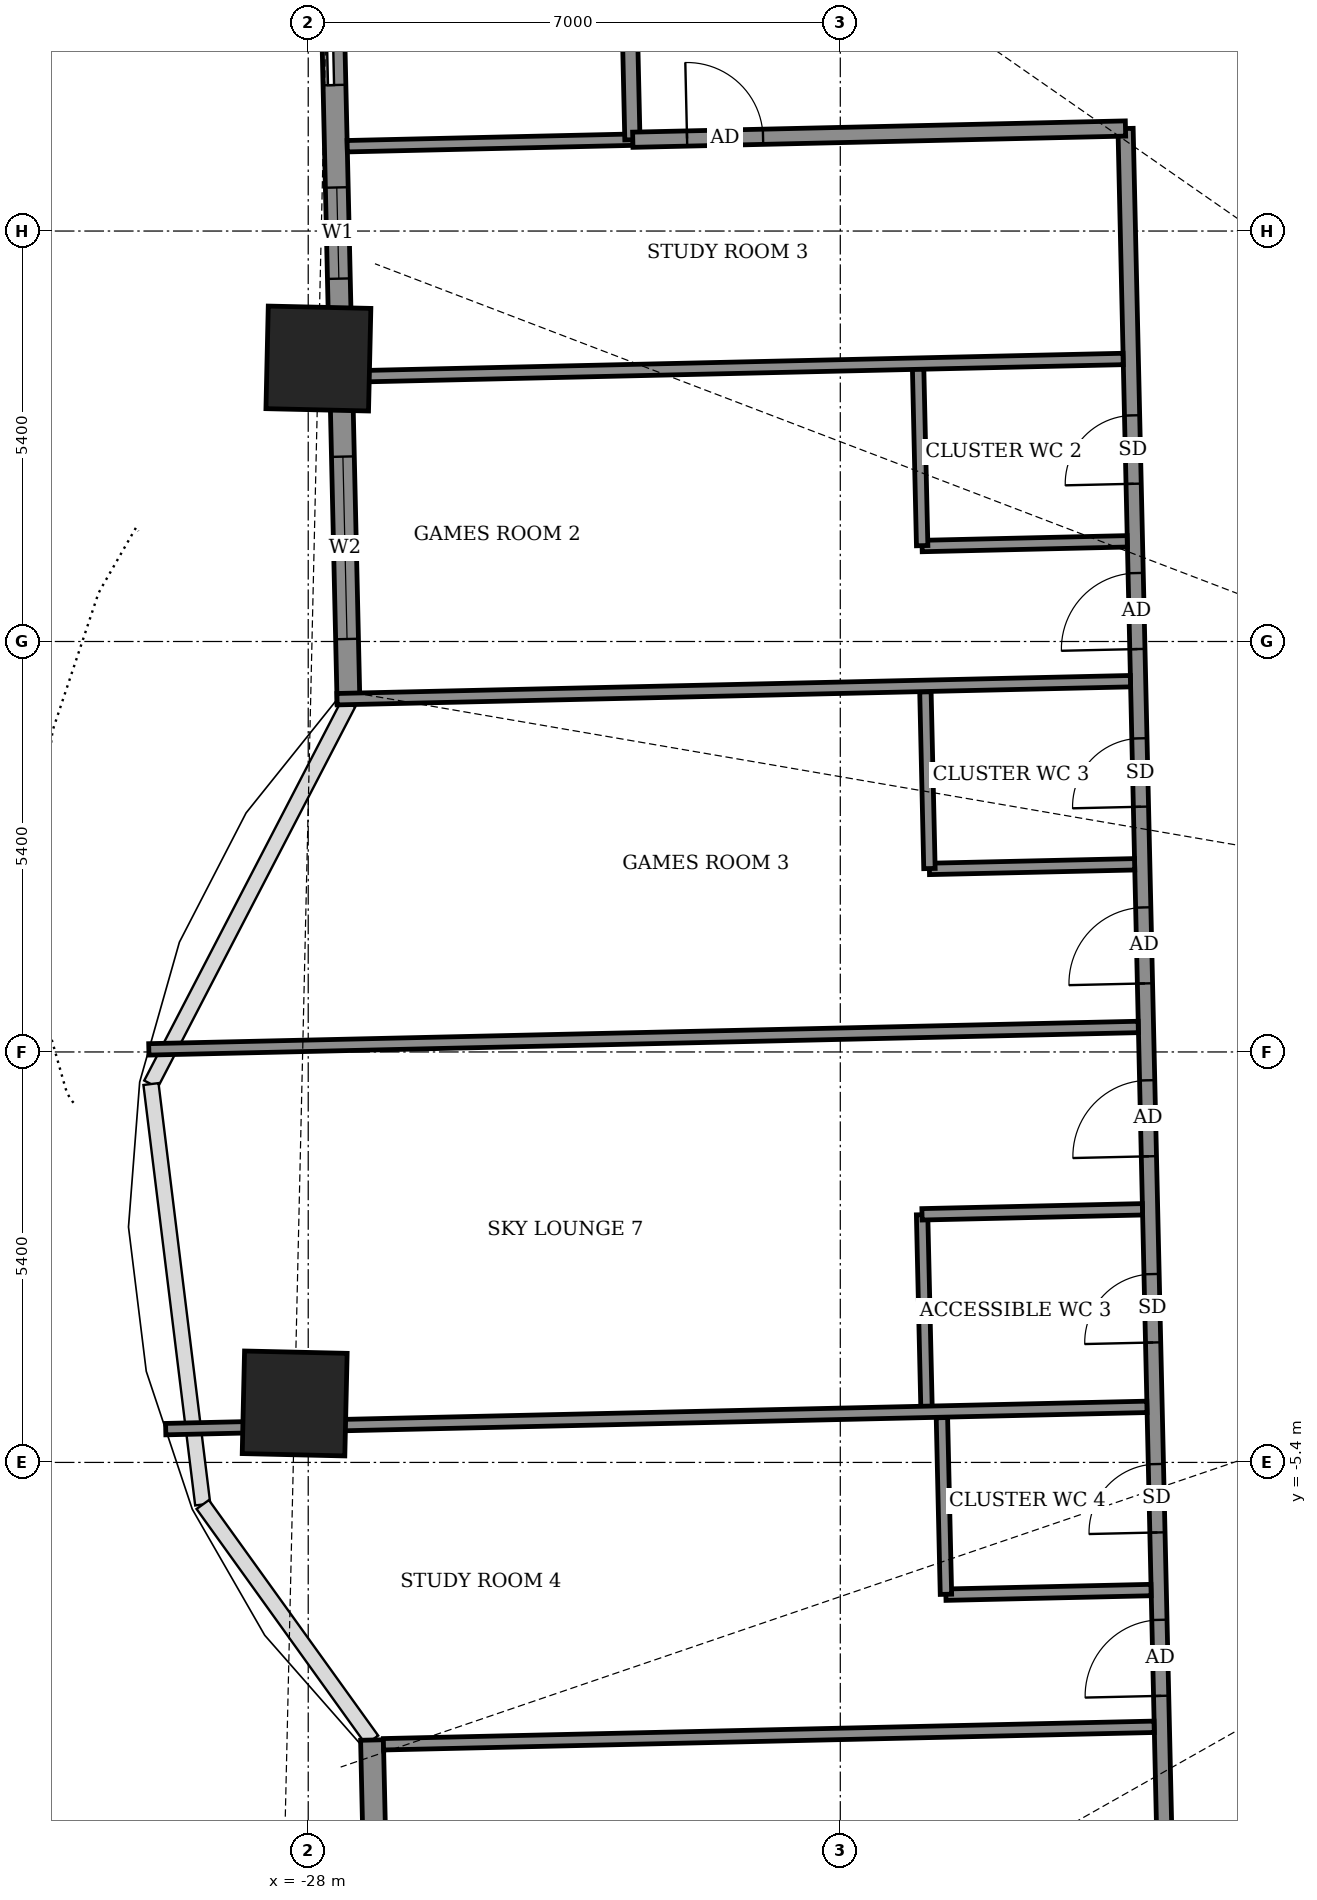
"""IFC4 building model, lengths in metres.
Left out: names, types, materials, properties, quantities, classifications, styles, units other than length and angle.
Written with IfcOpenShell. Run it as: python <this file> out.ifc"""

import sys

from ifc_helpers import new_model, si_unit, direction, frame, frame_2d, origin, origin_2d, place, context, subcontext, project, spatial, rectangle, extrude, element, fill, save


model = new_model("IFC4")
c1 = context("Model", 3, precision=1e-05, world=origin(), true_north=direction((0.0, 1.0)))
c2 = subcontext(c1, "Body", "Model", "MODEL_VIEW")
j1 = project(units=[si_unit("LENGTHUNIT", "METRE"), si_unit("PLANEANGLEUNIT", "RADIAN")], contexts=[c1])
p1 = place(None, origin())
s1 = spatial("IfcSite", under=j1, at=p1, CompositionType="ELEMENT")
p2 = place(p1, origin())
s2 = spatial("IfcBuilding", under=s1, at=p2, CompositionType="ELEMENT")
p3 = place(p2, frame((0.0, 0.0, 125.5)))
s3 = spatial("IfcBuildingStorey", under=s2, at=p3, CompositionType="ELEMENT", Elevation=125.5)
for number, where, z_axis, x_axis in (
    (1, (-28.178, -4.624, -0.55), (0.0, 0.0, 1.0), (-0.023, -1.0, 0.0)),
    (2, (-27.866, 9.123, -0.55), (0.0, 0.0, 1.0), (-0.023, -1.0, 0.0)),
):
    element("IfcColumn", number, at=place(p3, frame(where, z_axis=z_axis, x_axis=x_axis)), inside=s3, PredefinedType="COLUMN", context=c2, shape_type="SweptSolid", body=[
        extrude(rectangle(XDim=1.35, YDim=1.35, at=origin_2d()), origin(), (0.0, 0.0, 1.0), 4.6),
    ])
p4 = place(p3, frame((-27.733, 16.154, 0.0), z_axis=(0.0, 0.0, 1.0), x_axis=(0.022721884592, -0.999741824653, 0.0)))
e3 = element("IfcWall", 3, at=p4, inside=s3, PredefinedType="SOLIDWALL", context=c2, shape_type="SweptSolid", body=[
    extrude(rectangle(XDim=11.572, YDim=0.3, at=frame_2d((5.786, 0.0))), origin(), (0.0, 0.0, 1.0), 2.65),
])
p5 = place(p4, frame((1.934, 0.0, 0.0)))
e4 = element("IfcOpeningElement", 4, at=p5, cuts=e3, PredefinedType="OPENING", context=c2, shape_type="SweptSolid", body=[
    extrude(rectangle(XDim=1.5, YDim=2.4, at=frame_2d((0.75, 1.2))), frame((0.0, 0.16, 0.0), z_axis=(0.0, -1.0, 0.0), x_axis=(1.0, 0.0, 0.0)), (0.0, 0.0, 1.0), 0.32),
])
p6 = place(p4, frame((4.782, 0.0, 0.9)))
e5 = element("IfcOpeningElement", 5, at=p6, cuts=e3, PredefinedType="OPENING", context=c2, shape_type="SweptSolid", body=[
    extrude(rectangle(XDim=1.2, YDim=1.5, at=frame_2d((0.6, 0.75))), frame((0.0, 0.16, 0.0), z_axis=(0.0, -1.0, 0.0), x_axis=(1.0, 0.0, 0.0)), (0.0, 0.0, 1.0), 0.32),
])
p7 = place(p4, frame((8.324, 0.0, 0.9)))
e6 = element("IfcOpeningElement", 6, at=p7, cuts=e3, PredefinedType="OPENING", context=c2, shape_type="SweptSolid", body=[
    extrude(rectangle(XDim=2.4, YDim=1.5, at=frame_2d((1.2, 0.75))), frame((0.0, 0.16, 0.0), z_axis=(0.0, -1.0, 0.0), x_axis=(1.0, 0.0, 0.0)), (0.0, 0.0, 1.0), 0.32),
])
p8 = place(p3, frame((-27.161, -9.052, 0.0), z_axis=(0.0, 0.0, 1.0), x_axis=(0.022665616813, -0.999743101909, 0.0)))
e7 = element("IfcWall", 7, at=p8, inside=s3, PredefinedType="SOLIDWALL", context=c2, shape_type="SweptSolid", body=[
    extrude(rectangle(XDim=11.73, YDim=0.3, at=frame_2d((5.865, 0.0))), origin(), (0.0, 0.0, 1.0), 2.55),
])
p9 = place(p8, frame((4.231, 0.0, 0.0)))
e8 = element("IfcOpeningElement", 8, at=p9, cuts=e7, PredefinedType="OPENING", context=c2, shape_type="SweptSolid", body=[
    extrude(rectangle(XDim=1.5, YDim=2.4, at=frame_2d((0.75, 1.2))), frame((0.0, 0.16, 0.0), z_axis=(0.0, -1.0, 0.0), x_axis=(1.0, 0.0, 0.0)), (0.0, 0.0, 1.0), 0.32),
])
p10 = place(p8, frame((9.847, 0.0, 0.9)))
e9 = element("IfcOpeningElement", 9, at=p10, cuts=e7, PredefinedType="OPENING", context=c2, shape_type="SweptSolid", body=[
    extrude(rectangle(XDim=1.2, YDim=1.5, at=frame_2d((0.6, 0.75))), frame((0.0, 0.16, 0.0), z_axis=(0.0, -1.0, 0.0), x_axis=(1.0, 0.0, 0.0)), (0.0, 0.0, 1.0), 0.32),
])
p11 = place(p3, frame((-30.307, 7.701, 0.0), z_axis=(0.0, 0.0, 1.0), x_axis=(-0.022706615587, 0.999742171567, 0.0)))
e10 = element("IfcWall", 10, at=p11, inside=s3, PredefinedType="USERDEFINED", context=c2, shape_type="SweptSolid", body=[
    extrude(rectangle(XDim=6.0, YDim=0.55, at=frame_2d((3.0, 0.0))), origin(), (0.0, 0.0, 1.0), 0.8),
])
p12 = place(p3, frame((-29.853, -12.294, 0.0), z_axis=(0.0, 0.0, 1.0), x_axis=(-0.022590224177, 0.999744808324, 0.0)))
e11 = element("IfcWall", 11, at=p12, inside=s3, PredefinedType="USERDEFINED", context=c2, shape_type="SweptSolid", body=[
    extrude(rectangle(XDim=2.875, YDim=0.55, at=frame_2d((1.438, 0.0))), origin(), (0.0, 0.0, 1.0), 0.8),
])
p13 = place(p3, frame((-16.603, -16.218, 0.0), z_axis=(0.0, 0.0, 1.0), x_axis=(-0.022698146637, 0.999742363881, 0.0)))
e12 = element("IfcWall", 12, at=p13, inside=s3, PredefinedType="PARTITIONING", context=c2, shape_type="SweptSolid", body=[
    extrude(rectangle(XDim=28.374, YDim=0.2, at=frame_2d((14.187, 0.0))), origin(), (0.0, 0.0, 1.0), 2.55),
])
p14 = place(p13, frame((21.524, 0.0, 0.0)))
e13 = element("IfcOpeningElement", 13, at=p14, cuts=e12, PredefinedType="OPENING", context=c2, shape_type="SweptSolid", body=[
    extrude(rectangle(XDim=1.0, YDim=2.1, at=frame_2d((0.5, 1.05))), frame((0.0, 0.11, 0.0), z_axis=(0.0, -1.0, 0.0), x_axis=(1.0, 0.0, 0.0)), (0.0, 0.0, 1.0), 0.22),
])
p15 = place(p13, frame((23.699, 0.0, 0.0)))
e14 = element("IfcOpeningElement", 14, at=p15, cuts=e12, PredefinedType="OPENING", context=c2, shape_type="SweptSolid", body=[
    extrude(rectangle(XDim=0.9, YDim=2.1, at=frame_2d((0.45, 1.05))), frame((0.0, 0.11, 0.0), z_axis=(0.0, -1.0, 0.0), x_axis=(1.0, 0.0, 0.0)), (0.0, 0.0, 1.0), 0.22),
])
p16 = place(p13, frame((17.124, 0.0, 0.0)))
e15 = element("IfcOpeningElement", 15, at=p16, cuts=e12, PredefinedType="OPENING", context=c2, shape_type="SweptSolid", body=[
    extrude(rectangle(XDim=1.0, YDim=2.1, at=frame_2d((0.5, 1.05))), frame((0.0, 0.11, 0.0), z_axis=(0.0, -1.0, 0.0), x_axis=(1.0, 0.0, 0.0)), (0.0, 0.0, 1.0), 0.22),
])
p17 = place(p13, frame((19.449, 0.0, 0.0)))
e16 = element("IfcOpeningElement", 16, at=p17, cuts=e12, PredefinedType="OPENING", context=c2, shape_type="SweptSolid", body=[
    extrude(rectangle(XDim=0.9, YDim=2.1, at=frame_2d((0.45, 1.05))), frame((0.0, 0.11, 0.0), z_axis=(0.0, -1.0, 0.0), x_axis=(1.0, 0.0, 0.0)), (0.0, 0.0, 1.0), 0.22),
])
p18 = place(p13, frame((14.849, 0.0, 0.0)))
e17 = element("IfcOpeningElement", 17, at=p18, cuts=e12, PredefinedType="OPENING", context=c2, shape_type="SweptSolid", body=[
    extrude(rectangle(XDim=1.0, YDim=2.1, at=frame_2d((0.5, 1.05))), frame((0.0, 0.11, 0.0), z_axis=(0.0, -1.0, 0.0), x_axis=(1.0, 0.0, 0.0)), (0.0, 0.0, 1.0), 0.22),
])
p19 = place(p13, frame((12.399, 0.0, 0.0)))
e18 = element("IfcOpeningElement", 18, at=p19, cuts=e12, PredefinedType="OPENING", context=c2, shape_type="SweptSolid", body=[
    extrude(rectangle(XDim=0.9, YDim=2.1, at=frame_2d((0.45, 1.05))), frame((0.0, 0.11, 0.0), z_axis=(0.0, -1.0, 0.0), x_axis=(1.0, 0.0, 0.0)), (0.0, 0.0, 1.0), 0.22),
])
p20 = place(p13, frame((7.749, 0.0, 0.0)))
e19 = element("IfcOpeningElement", 19, at=p20, cuts=e12, PredefinedType="OPENING", context=c2, shape_type="SweptSolid", body=[
    extrude(rectangle(XDim=1.0, YDim=2.1, at=frame_2d((0.5, 1.05))), frame((0.0, 0.11, 0.0), z_axis=(0.0, -1.0, 0.0), x_axis=(1.0, 0.0, 0.0)), (0.0, 0.0, 1.0), 0.22),
])
p21 = place(p13, frame((9.899, 0.0, 0.0)))
e20 = element("IfcOpeningElement", 20, at=p21, cuts=e12, PredefinedType="OPENING", context=c2, shape_type="SweptSolid", body=[
    extrude(rectangle(XDim=0.9, YDim=2.1, at=frame_2d((0.45, 1.05))), frame((0.0, 0.11, 0.0), z_axis=(0.0, -1.0, 0.0), x_axis=(1.0, 0.0, 0.0)), (0.0, 0.0, 1.0), 0.22),
])
p22 = place(p13, frame((4.374, 0.0, 0.0)))
e21 = element("IfcOpeningElement", 21, at=p22, cuts=e12, PredefinedType="OPENING", context=c2, shape_type="SweptSolid", body=[
    extrude(rectangle(XDim=1.0, YDim=2.1, at=frame_2d((0.5, 1.05))), frame((0.0, 0.11, 0.0), z_axis=(0.0, -1.0, 0.0), x_axis=(1.0, 0.0, 0.0)), (0.0, 0.0, 1.0), 0.22),
])
p23 = place(p13, frame((0.75, 0.0, 0.0)))
e22 = element("IfcOpeningElement", 22, at=p23, cuts=e12, PredefinedType="OPENING", context=c2, shape_type="SweptSolid", body=[
    extrude(rectangle(XDim=0.9, YDim=2.1, at=frame_2d((0.45, 1.05))), frame((0.0, 0.11, 0.0), z_axis=(0.0, -1.0, 0.0), x_axis=(1.0, 0.0, 0.0)), (0.0, 0.0, 1.0), 0.22),
])
p24 = place(p3, frame((-27.01, -9.108, 0.0), z_axis=(0.0, 0.0, 1.0), x_axis=(0.999742841246, 0.022677111331, 0.0)))
e23 = element("IfcWall", 23, at=p24, inside=s3, PredefinedType="PARTITIONING", context=c2, shape_type="SweptSolid", body=[
    extrude(rectangle(XDim=10.142, YDim=0.15, at=frame_2d((5.071, 0.0))), origin(), (0.0, 0.0, 1.0), 2.55),
])
p25 = place(p3, frame((-19.611, -7.14, 0.0), z_axis=(0.0, 0.0, 1.0), x_axis=(0.999746436932, 0.022518033722, 0.0)))
e24 = element("IfcWall", 24, at=p25, inside=s3, PredefinedType="PARTITIONING", context=c2, shape_type="SweptSolid", body=[
    extrude(rectangle(XDim=2.7, YDim=0.15, at=frame_2d((1.35, 0.0))), origin(), (0.0, 0.0, 1.0), 2.65),
])
p26 = place(p3, frame((-19.61, -7.135, 0.0), z_axis=(0.0, 0.0, 1.0), x_axis=(-0.02279059109, 0.999740260747, 0.0)))
e25 = element("IfcWall", 25, at=p26, inside=s3, PredefinedType="PARTITIONING", context=c2, shape_type="SweptSolid", body=[
    extrude(rectangle(XDim=2.324, YDim=0.15, at=frame_2d((1.162, 0.0))), origin(), (0.0, 0.0, 1.0), 2.65),
])
p27 = place(p3, frame((-19.866, -4.665, 0.0), z_axis=(0.0, 0.0, 1.0), x_axis=(-0.023015762656, 0.999735102249, 0.0)))
e26 = element("IfcWall", 26, at=p27, inside=s3, PredefinedType="PARTITIONING", context=c2, shape_type="SweptSolid", body=[
    extrude(rectangle(XDim=2.525, YDim=0.15, at=frame_2d((1.262, 0.0))), origin(), (0.0, 0.0, 1.0), 4.05),
])
p28 = place(p3, frame((-29.875, -4.962, 0.0), z_axis=(0.0, 0.0, 1.0), x_axis=(0.999742567124, 0.022689193013, 0.0)))
e27 = element("IfcWall", 27, at=p28, inside=s3, PredefinedType="PARTITIONING", context=c2, shape_type="SweptSolid", body=[
    extrude(rectangle(XDim=12.912, YDim=0.15, at=frame_2d((6.456, 0.0))), origin(), (0.0, 0.0, 1.0), 0.93),
])
p29 = place(p3, frame((-19.925, -2.136, 0.0), z_axis=(0.0, 0.0, 1.0), x_axis=(0.999741792094, 0.022723317103, 0.0)))
e28 = element("IfcWall", 28, at=p29, inside=s3, PredefinedType="PARTITIONING", context=c2, shape_type="SweptSolid", body=[
    extrude(rectangle(XDim=2.901, YDim=0.15, at=frame_2d((1.45, 0.0))), origin(), (0.0, 0.0, 1.0), 4.05),
])
p30 = place(p3, frame((-30.097, 0.034, 0.0), z_axis=(0.0, 0.0, 1.0), x_axis=(0.999743005544, 0.022669866904, 0.0)))
e29 = element("IfcWall", 29, at=p30, inside=s3, PredefinedType="PARTITIONING", context=c2, shape_type="SweptSolid", body=[
    extrude(rectangle(XDim=13.02, YDim=0.15, at=frame_2d((6.51, 0.0))), origin(), (0.0, 0.0, 1.0), 0.93),
])
p31 = place(p3, frame((-19.828, 2.408, 0.0), z_axis=(0.0, 0.0, 1.0), x_axis=(0.99974458177, 0.022600248254, 0.0)))
e30 = element("IfcWall", 30, at=p31, inside=s3, PredefinedType="PARTITIONING", context=c2, shape_type="SweptSolid", body=[
    extrude(rectangle(XDim=2.701, YDim=0.15, at=frame_2d((1.35, 0.0))), origin(), (0.0, 0.0, 1.0), 2.75),
])
p32 = place(p3, frame((-19.827, 2.413, 0.0), z_axis=(0.0, 0.0, 1.0), x_axis=(-0.02279059109, 0.999740260747, 0.0)))
e31 = element("IfcWall", 31, at=p32, inside=s3, PredefinedType="PARTITIONING", context=c2, shape_type="SweptSolid", body=[
    extrude(rectangle(XDim=2.324, YDim=0.15, at=frame_2d((1.162, 0.0))), origin(), (0.0, 0.0, 1.0), 2.75),
])
p33 = place(p3, frame((-27.621, 4.641, 0.0), z_axis=(0.0, 0.0, 1.0), x_axis=(0.999742728106, 0.022682098664, 0.0)))
e32 = element("IfcWall", 32, at=p33, inside=s3, PredefinedType="PARTITIONING", context=c2, shape_type="SweptSolid", body=[
    extrude(rectangle(XDim=10.441, YDim=0.15, at=frame_2d((5.22, 0.0))), origin(), (0.0, 0.0, 1.0), 2.65),
])
p34 = place(p3, frame((-19.924, 6.656, 0.0), z_axis=(0.0, 0.0, 1.0), x_axis=(0.999736155505, 0.022969966847, 0.0)))
e33 = element("IfcWall", 33, at=p34, inside=s3, PredefinedType="PARTITIONING", context=c2, shape_type="SweptSolid", body=[
    extrude(rectangle(XDim=2.7, YDim=0.15, at=frame_2d((1.35, 0.0))), origin(), (0.0, 0.0, 1.0), 2.65),
])
p35 = place(p3, frame((-19.923, 6.661, 0.0), z_axis=(0.0, 0.0, 1.0), x_axis=(-0.022778632478, 0.99974053329, 0.0)))
e34 = element("IfcWall", 34, at=p35, inside=s3, PredefinedType="PARTITIONING", context=c2, shape_type="SweptSolid", body=[
    extrude(rectangle(XDim=2.326, YDim=0.15, at=frame_2d((1.163, 0.0))), origin(), (0.0, 0.0, 1.0), 2.65),
])
p36 = place(p3, frame((-27.418, 8.887, 0.0), z_axis=(0.0, 0.0, 1.0), x_axis=(0.999742841246, 0.022677111331, 0.0)))
e35 = element("IfcWall", 35, at=p36, inside=s3, PredefinedType="PARTITIONING", context=c2, shape_type="SweptSolid", body=[
    extrude(rectangle(XDim=10.142, YDim=0.15, at=frame_2d((5.071, 0.0))), origin(), (0.0, 0.0, 1.0), 2.65),
])
p37 = place(p3, frame((-27.487, 11.916, 0.0), z_axis=(0.0, 0.0, 1.0), x_axis=(0.999739047234, 0.022843761417, 0.0)))
e36 = element("IfcWall", 36, at=p37, inside=s3, PredefinedType="PARTITIONING", context=c2, shape_type="SweptSolid", body=[
    extrude(rectangle(XDim=3.762, YDim=0.15, at=frame_2d((1.881, 0.0))), origin(), (0.0, 0.0, 1.0), 2.65),
])
p38 = place(p3, frame((-23.735, 12.001, 0.0), z_axis=(0.0, 0.0, 1.0), x_axis=(-0.022617910375, 0.999744182344, 0.0)))
e37 = element("IfcWall", 37, at=p38, inside=s3, PredefinedType="PARTITIONING", context=c2, shape_type="SweptSolid", body=[
    extrude(rectangle(XDim=1.5, YDim=0.2, at=frame_2d((0.75, 0.0))), origin(), (0.0, 0.0, 1.0), 4.05),
])
p39 = place(p3, frame((-23.73, 12.001, 0.0), z_axis=(0.0, 0.0, 1.0), x_axis=(0.999739614647, 0.022818915498, 0.0)))
e38 = element("IfcWall", 38, at=p39, inside=s3, PredefinedType="PARTITIONING", context=c2, shape_type="SweptSolid", body=[
    extrude(rectangle(XDim=6.484, YDim=0.2, at=frame_2d((3.242, 0.0))), origin(), (0.0, 0.0, 1.0), 2.55),
])
p40 = place(p39, frame((0.714, 0.0, 0.0)))
e39 = element("IfcOpeningElement", 39, at=p40, cuts=e38, PredefinedType="OPENING", context=c2, shape_type="SweptSolid", body=[
    extrude(rectangle(XDim=1.0, YDim=2.1, at=frame_2d((0.5, 1.05))), frame((0.0, 0.11, 0.0), z_axis=(0.0, -1.0, 0.0), x_axis=(1.0, 0.0, 0.0)), (0.0, 0.0, 1.0), 0.22),
])
p41 = place(p5, origin())
e40 = element("IfcDoor", 40, at=p41, inside=s3, OperationType="SLIDING_TO_LEFT", PredefinedType="DOOR", context=c2, shape_type="SweptSolid", body=[
    extrude(rectangle(XDim=1.5, YDim=2.4, at=frame_2d((0.75, 1.2))), frame((0.0, 0.025, 0.0), z_axis=(0.0, -1.0, 0.0), x_axis=(1.0, 0.0, 0.0)), (0.0, 0.0, 1.0), 0.05),
])
fill(e4, e40)
p42 = place(p6, origin())
e41 = element("IfcWindow", 41, at=p42, inside=s3, PartitioningType="SINGLE_PANEL", PredefinedType="WINDOW", context=c2, shape_type="SweptSolid", body=[
    extrude(rectangle(XDim=1.2, YDim=1.5, at=frame_2d((0.6, 0.75))), frame((0.0, 0.03, 0.0), z_axis=(0.0, -1.0, 0.0), x_axis=(1.0, 0.0, 0.0)), (0.0, 0.0, 1.0), 0.06),
])
fill(e5, e41)
p43 = place(p7, origin())
e42 = element("IfcWindow", 42, at=p43, inside=s3, PartitioningType="DOUBLE_PANEL_VERTICAL", PredefinedType="WINDOW", context=c2, shape_type="SweptSolid", body=[
    extrude(rectangle(XDim=2.4, YDim=1.5, at=frame_2d((1.2, 0.75))), frame((0.0, 0.03, 0.0), z_axis=(0.0, -1.0, 0.0), x_axis=(1.0, 0.0, 0.0)), (0.0, 0.0, 1.0), 0.06),
])
fill(e6, e42)
p44 = place(p40, origin())
e43 = element("IfcDoor", 43, at=p44, inside=s3, OperationType="SINGLE_SWING_RIGHT", PredefinedType="DOOR", context=c2, shape_type="SweptSolid", body=[
    extrude(rectangle(XDim=1.0, YDim=2.1, at=frame_2d((0.5, 1.05))), frame((0.0, 0.025, 0.0), z_axis=(0.0, -1.0, 0.0), x_axis=(1.0, 0.0, 0.0)), (0.0, 0.0, 1.0), 0.05),
])
fill(e39, e43)
p45 = place(p14, origin())
e44 = element("IfcDoor", 44, at=p45, inside=s3, OperationType="SINGLE_SWING_LEFT", PredefinedType="DOOR", context=c2, shape_type="SweptSolid", body=[
    extrude(rectangle(XDim=1.0, YDim=2.1, at=frame_2d((0.5, 1.05))), frame((0.0, 0.025, 0.0), z_axis=(0.0, -1.0, 0.0), x_axis=(1.0, 0.0, 0.0)), (0.0, 0.0, 1.0), 0.05),
])
fill(e13, e44)
p46 = place(p15, origin())
e45 = element("IfcDoor", 45, at=p46, inside=s3, OperationType="SINGLE_SWING_LEFT", PredefinedType="DOOR", context=c2, shape_type="SweptSolid", body=[
    extrude(rectangle(XDim=0.9, YDim=2.1, at=frame_2d((0.45, 1.05))), frame((0.0, 0.025, 0.0), z_axis=(0.0, -1.0, 0.0), x_axis=(1.0, 0.0, 0.0)), (0.0, 0.0, 1.0), 0.05),
])
fill(e14, e45)
p47 = place(p16, origin())
e46 = element("IfcDoor", 46, at=p47, inside=s3, OperationType="SINGLE_SWING_RIGHT", PredefinedType="DOOR", context=c2, shape_type="SweptSolid", body=[
    extrude(rectangle(XDim=1.0, YDim=2.1, at=frame_2d((0.5, 1.05))), frame((0.0, 0.025, 0.0), z_axis=(0.0, -1.0, 0.0), x_axis=(1.0, 0.0, 0.0)), (0.0, 0.0, 1.0), 0.05),
])
fill(e15, e46)
p48 = place(p17, origin())
e47 = element("IfcDoor", 47, at=p48, inside=s3, OperationType="SINGLE_SWING_RIGHT", PredefinedType="DOOR", context=c2, shape_type="SweptSolid", body=[
    extrude(rectangle(XDim=0.9, YDim=2.1, at=frame_2d((0.45, 1.05))), frame((0.0, 0.025, 0.0), z_axis=(0.0, -1.0, 0.0), x_axis=(1.0, 0.0, 0.0)), (0.0, 0.0, 1.0), 0.05),
])
fill(e16, e47)
p49 = place(p18, origin())
e48 = element("IfcDoor", 48, at=p49, inside=s3, OperationType="SINGLE_SWING_LEFT", PredefinedType="DOOR", context=c2, shape_type="SweptSolid", body=[
    extrude(rectangle(XDim=1.0, YDim=2.1, at=frame_2d((0.5, 1.05))), frame((0.0, 0.025, 0.0), z_axis=(0.0, -1.0, 0.0), x_axis=(1.0, 0.0, 0.0)), (0.0, 0.0, 1.0), 0.05),
])
fill(e17, e48)
p50 = place(p19, origin())
e49 = element("IfcDoor", 49, at=p50, inside=s3, OperationType="SINGLE_SWING_LEFT", PredefinedType="DOOR", context=c2, shape_type="SweptSolid", body=[
    extrude(rectangle(XDim=0.9, YDim=2.1, at=frame_2d((0.45, 1.05))), frame((0.0, 0.025, 0.0), z_axis=(0.0, -1.0, 0.0), x_axis=(1.0, 0.0, 0.0)), (0.0, 0.0, 1.0), 0.05),
])
fill(e18, e49)
p51 = place(p20, origin())
e50 = element("IfcDoor", 50, at=p51, inside=s3, OperationType="SINGLE_SWING_RIGHT", PredefinedType="DOOR", context=c2, shape_type="SweptSolid", body=[
    extrude(rectangle(XDim=1.0, YDim=2.1, at=frame_2d((0.5, 1.05))), frame((0.0, 0.025, 0.0), z_axis=(0.0, -1.0, 0.0), x_axis=(1.0, 0.0, 0.0)), (0.0, 0.0, 1.0), 0.05),
])
fill(e19, e50)
p52 = place(p21, origin())
e51 = element("IfcDoor", 51, at=p52, inside=s3, OperationType="SINGLE_SWING_RIGHT", PredefinedType="DOOR", context=c2, shape_type="SweptSolid", body=[
    extrude(rectangle(XDim=0.9, YDim=2.1, at=frame_2d((0.45, 1.05))), frame((0.0, 0.025, 0.0), z_axis=(0.0, -1.0, 0.0), x_axis=(1.0, 0.0, 0.0)), (0.0, 0.0, 1.0), 0.05),
])
fill(e20, e51)
save(model, sys.argv[1])
